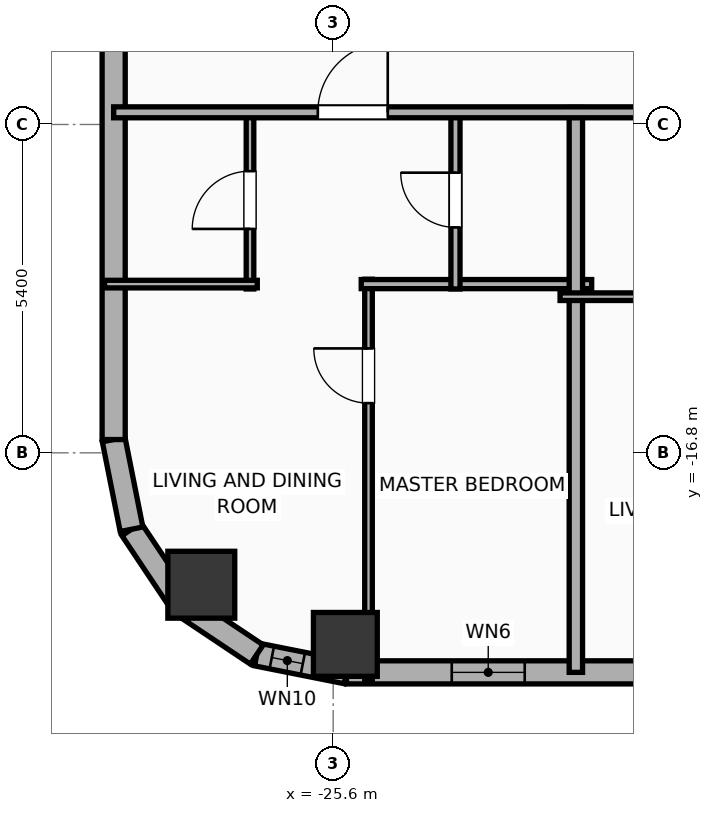
"""IFC4 building model, lengths in metres.
Left out: names, types, materials, properties, quantities, classifications, styles, units other than length and angle.
Written with IfcOpenShell. Run it as: python <this file> out.ifc"""

import sys

from ifc_helpers import new_model, si_unit, direction, frame, frame_2d, origin, origin_2d, place, context, subcontext, project, spatial, rectangle, hollow_rectangle, hollow_circle, extrude, element, fill, save


model = new_model("IFC4")
c1 = context("Model", 3, precision=1e-05, world=origin(), true_north=direction((0.0, 1.0)))
c2 = subcontext(c1, "Body", "Model", "MODEL_VIEW")
j1 = project(units=[si_unit("LENGTHUNIT", "METRE"), si_unit("PLANEANGLEUNIT", "RADIAN")], contexts=[c1])
p1 = place(None, origin())
s1 = spatial("IfcSite", under=j1, at=p1, CompositionType="ELEMENT")
p2 = place(p1, origin())
s2 = spatial("IfcBuilding", under=s1, at=p2, CompositionType="ELEMENT")
p3 = place(p2, frame((0.0, 0.0, 120.9)))
s3 = spatial("IfcBuildingStorey", under=s2, at=p3, CompositionType="ELEMENT", Elevation=120.9)
p4 = place(p3, frame((-25.4, -19.95, 0.0), z_axis=(0.0, 0.0, 1.0), x_axis=(1.0, 0.0, 0.0)))
e1 = element("IfcColumn", 1, at=p4, inside=s3, PredefinedType="COLUMN", context=c2, shape_type="SweptSolid", body=[
    extrude(hollow_rectangle(XDim=1.05, YDim=1.05, WallThickness=0.036, at=origin_2d()), origin(), (0.0, 0.0, 1.0), 3.9),
])
p5 = place(p3, frame((-27.769, -18.969, 0.0), z_axis=(0.0, 0.0, 1.0), x_axis=(1.0, 0.0, 0.0)))
e2 = element("IfcColumn", 2, at=p5, inside=s3, PredefinedType="COLUMN", context=c2, shape_type="SweptSolid", body=[
    extrude(hollow_circle(Radius=0.55, WallThickness=0.036, at=origin_2d()), origin(), (0.0, 0.0, 1.0), 3.9),
])
p6 = place(p3, frame((29.381, -20.41, 0.0), z_axis=(0.0, 0.0, 1.0), x_axis=(-1.0, 0.0, 0.0)))
e3 = element("IfcWall", 3, at=p6, inside=s3, PredefinedType="ELEMENTEDWALL", context=c2, shape_type="SweptSolid", body=[
    extrude(rectangle(XDim=54.763, YDim=0.38, at=frame_2d((27.381, 0.0))), origin(), (0.0, 0.0, 1.0), 3.65),
])
p7 = place(p6, frame((5.645, 0.0, 0.75)))
e4 = element("IfcOpeningElement", 4, at=p7, cuts=e3, PredefinedType="OPENING", context=c2, shape_type="SweptSolid", body=[
    extrude(rectangle(XDim=2.4, YDim=2.1, at=frame_2d((1.2, 1.05))), frame((0.0, 0.2, 0.0), z_axis=(0.0, -1.0, 0.0), x_axis=(1.0, 0.0, 0.0)), (0.0, 0.0, 1.0), 0.4),
])
p8 = place(p6, frame((47.567, 0.0, 0.75)))
e5 = element("IfcOpeningElement", 5, at=p8, cuts=e3, PredefinedType="OPENING", context=c2, shape_type="SweptSolid", body=[
    extrude(rectangle(XDim=2.4, YDim=2.1, at=frame_2d((1.2, 1.05))), frame((0.0, 0.2, 0.0), z_axis=(0.0, -1.0, 0.0), x_axis=(1.0, 0.0, 0.0)), (0.0, 0.0, 1.0), 0.4),
])
p9 = place(p6, frame((51.831, 0.0, 0.75)))
e6 = element("IfcOpeningElement", 6, at=p9, cuts=e3, PredefinedType="OPENING", context=c2, shape_type="SweptSolid", body=[
    extrude(rectangle(XDim=1.2, YDim=2.05, at=frame_2d((0.6, 1.025))), frame((0.0, 0.2, 0.0), z_axis=(0.0, -1.0, 0.0), x_axis=(1.0, 0.0, 0.0)), (0.0, 0.0, 1.0), 0.4),
])
p10 = place(p6, frame((44.606, 0.0, 0.75)))
e7 = element("IfcOpeningElement", 7, at=p10, cuts=e3, PredefinedType="OPENING", context=c2, shape_type="SweptSolid", body=[
    extrude(rectangle(XDim=1.2, YDim=2.05, at=frame_2d((0.6, 1.025))), frame((0.0, 0.2, 0.0), z_axis=(0.0, -1.0, 0.0), x_axis=(1.0, 0.0, 0.0)), (0.0, 0.0, 1.0), 0.4),
])
p11 = place(p6, frame((40.986, 0.0, 0.75)))
e8 = element("IfcOpeningElement", 8, at=p11, cuts=e3, PredefinedType="OPENING", context=c2, shape_type="SweptSolid", body=[
    extrude(rectangle(XDim=1.2, YDim=2.05, at=frame_2d((0.6, 1.025))), frame((0.0, 0.2, 0.0), z_axis=(0.0, -1.0, 0.0), x_axis=(1.0, 0.0, 0.0)), (0.0, 0.0, 1.0), 0.4),
])
p12 = place(p6, frame((37.486, 0.0, 0.75)))
e9 = element("IfcOpeningElement", 9, at=p12, cuts=e3, PredefinedType="OPENING", context=c2, shape_type="SweptSolid", body=[
    extrude(rectangle(XDim=1.2, YDim=2.05, at=frame_2d((0.6, 1.025))), frame((0.0, 0.2, 0.0), z_axis=(0.0, -1.0, 0.0), x_axis=(1.0, 0.0, 0.0)), (0.0, 0.0, 1.0), 0.4),
])
p13 = place(p6, frame((33.986, 0.0, 0.75)))
e10 = element("IfcOpeningElement", 10, at=p13, cuts=e3, PredefinedType="OPENING", context=c2, shape_type="SweptSolid", body=[
    extrude(rectangle(XDim=1.2, YDim=2.05, at=frame_2d((0.6, 1.025))), frame((0.0, 0.2, 0.0), z_axis=(0.0, -1.0, 0.0), x_axis=(1.0, 0.0, 0.0)), (0.0, 0.0, 1.0), 0.4),
])
p14 = place(p6, frame((30.486, 0.0, 0.75)))
e11 = element("IfcOpeningElement", 11, at=p14, cuts=e3, PredefinedType="OPENING", context=c2, shape_type="SweptSolid", body=[
    extrude(rectangle(XDim=1.2, YDim=2.05, at=frame_2d((0.6, 1.025))), frame((0.0, 0.2, 0.0), z_axis=(0.0, -1.0, 0.0), x_axis=(1.0, 0.0, 0.0)), (0.0, 0.0, 1.0), 0.4),
])
p15 = place(p6, frame((26.986, 0.0, 0.75)))
e12 = element("IfcOpeningElement", 12, at=p15, cuts=e3, PredefinedType="OPENING", context=c2, shape_type="SweptSolid", body=[
    extrude(rectangle(XDim=1.2, YDim=2.05, at=frame_2d((0.6, 1.025))), frame((0.0, 0.2, 0.0), z_axis=(0.0, -1.0, 0.0), x_axis=(1.0, 0.0, 0.0)), (0.0, 0.0, 1.0), 0.4),
])
p16 = place(p6, frame((23.486, 0.0, 0.75)))
e13 = element("IfcOpeningElement", 13, at=p16, cuts=e3, PredefinedType="OPENING", context=c2, shape_type="SweptSolid", body=[
    extrude(rectangle(XDim=1.2, YDim=2.05, at=frame_2d((0.6, 1.025))), frame((0.0, 0.2, 0.0), z_axis=(0.0, -1.0, 0.0), x_axis=(1.0, 0.0, 0.0)), (0.0, 0.0, 1.0), 0.4),
])
p17 = place(p6, frame((19.986, 0.0, 0.75)))
e14 = element("IfcOpeningElement", 14, at=p17, cuts=e3, PredefinedType="OPENING", context=c2, shape_type="SweptSolid", body=[
    extrude(rectangle(XDim=1.2, YDim=2.05, at=frame_2d((0.6, 1.025))), frame((0.0, 0.2, 0.0), z_axis=(0.0, -1.0, 0.0), x_axis=(1.0, 0.0, 0.0)), (0.0, 0.0, 1.0), 0.4),
])
p18 = place(p6, frame((16.486, 0.0, 0.75)))
e15 = element("IfcOpeningElement", 15, at=p18, cuts=e3, PredefinedType="OPENING", context=c2, shape_type="SweptSolid", body=[
    extrude(rectangle(XDim=1.2, YDim=2.05, at=frame_2d((0.6, 1.025))), frame((0.0, 0.2, 0.0), z_axis=(0.0, -1.0, 0.0), x_axis=(1.0, 0.0, 0.0)), (0.0, 0.0, 1.0), 0.4),
])
p19 = place(p6, frame((11.698, 0.0, 0.75)))
e16 = element("IfcOpeningElement", 16, at=p19, cuts=e3, PredefinedType="OPENING", context=c2, shape_type="SweptSolid", body=[
    extrude(rectangle(XDim=1.2, YDim=2.05, at=frame_2d((0.6, 1.025))), frame((0.0, 0.2, 0.0), z_axis=(0.0, -1.0, 0.0), x_axis=(1.0, 0.0, 0.0)), (0.0, 0.0, 1.0), 0.4),
])
p20 = place(p6, frame((3.172, 0.0, 0.75)))
e17 = element("IfcOpeningElement", 17, at=p20, cuts=e3, PredefinedType="OPENING", context=c2, shape_type="SweptSolid", body=[
    extrude(rectangle(XDim=1.2, YDim=2.05, at=frame_2d((0.6, 1.025))), frame((0.0, 0.2, 0.0), z_axis=(0.0, -1.0, 0.0), x_axis=(1.0, 0.0, 0.0)), (0.0, 0.0, 1.0), 0.4),
])
p21 = place(p6, frame((1.13, 0.0, 0.75)))
e18 = element("IfcOpeningElement", 18, at=p21, cuts=e3, PredefinedType="OPENING", context=c2, shape_type="SweptSolid", body=[
    extrude(rectangle(XDim=1.2, YDim=2.05, at=frame_2d((0.6, 1.025))), frame((0.0, 0.2, 0.0), z_axis=(0.0, -1.0, 0.0), x_axis=(1.0, 0.0, 0.0)), (0.0, 0.0, 1.0), 0.4),
])
p22 = place(p3, frame((-25.381, -20.41, 0.0), z_axis=(0.0, 0.0, 1.0), x_axis=(-0.980786132421, 0.195086038585, 0.0)))
e19 = element("IfcWall", 19, at=p22, inside=s3, PredefinedType="ELEMENTEDWALL", context=c2, shape_type="SweptSolid", body=[
    extrude(rectangle(XDim=1.504, YDim=0.38, at=frame_2d((0.752, 0.0))), origin(), (0.0, 0.0, 1.0), 3.65),
])
p23 = place(p22, frame((0.732, 0.0, 0.75)))
e20 = element("IfcOpeningElement", 20, at=p23, cuts=e19, PredefinedType="OPENING", context=c2, shape_type="SweptSolid", body=[
    extrude(rectangle(XDim=0.52, YDim=2.05, at=frame_2d((0.26, 1.025))), frame((0.0, 0.2, 0.0), z_axis=(0.0, -1.0, 0.0), x_axis=(1.0, 0.0, 0.0)), (0.0, 0.0, 1.0), 0.4),
])
p24 = place(p3, frame((-26.857, -20.116, 0.0), z_axis=(0.0, 0.0, 1.0), x_axis=(-0.831468045563, 0.555572577804, 0.0)))
e21 = element("IfcWall", 21, at=p24, inside=s3, PredefinedType="ELEMENTEDWALL", context=c2, shape_type="SweptSolid", body=[
    extrude(rectangle(XDim=1.485, YDim=0.38, at=frame_2d((0.742, 0.0))), origin(), (0.0, 0.0, 1.0), 3.65),
])
p25 = place(p3, frame((-28.091, -19.292, 0.0), z_axis=(0.0, 0.0, 1.0), x_axis=(-0.555610286119, 0.831442848281, 0.0)))
e22 = element("IfcWall", 22, at=p25, inside=s3, PredefinedType="ELEMENTEDWALL", context=c2, shape_type="SweptSolid", body=[
    extrude(rectangle(XDim=1.485, YDim=0.38, at=frame_2d((0.743, 0.0))), origin(), (0.0, 0.0, 1.0), 3.65),
])
p26 = place(p3, frame((-28.917, -18.057, 0.0), z_axis=(0.0, 0.0, 1.0), x_axis=(-0.195086038585, 0.980786132421, 0.0)))
e23 = element("IfcWall", 23, at=p26, inside=s3, PredefinedType="ELEMENTEDWALL", context=c2, shape_type="SweptSolid", body=[
    extrude(rectangle(XDim=1.504, YDim=0.38, at=frame_2d((0.752, 0.0))), origin(), (0.0, 0.0, 1.0), 3.65),
])
p27 = place(p3, frame((-29.21, -16.581, 0.0), z_axis=(0.0, 0.0, 1.0), x_axis=(0.0, 1.0, 0.0)))
e24 = element("IfcWall", 24, at=p27, inside=s3, PredefinedType="ELEMENTEDWALL", context=c2, shape_type="SweptSolid", body=[
    extrude(rectangle(XDim=34.363, YDim=0.38, at=frame_2d((17.181, 0.0))), origin(), (0.0, 0.0, 1.0), 3.65),
])
p28 = place(p27, frame((31.637, 0.0, 0.75)))
e25 = element("IfcOpeningElement", 25, at=p28, cuts=e24, PredefinedType="OPENING", context=c2, shape_type="SweptSolid", body=[
    extrude(rectangle(XDim=1.2, YDim=2.05, at=frame_2d((0.6, 1.025))), frame((0.0, 0.2, 0.0), z_axis=(0.0, -1.0, 0.0), x_axis=(1.0, 0.0, 0.0)), (0.0, 0.0, 1.0), 0.4),
])
p29 = place(p27, frame((20.876, 0.0, 0.75)))
e26 = element("IfcOpeningElement", 26, at=p29, cuts=e24, PredefinedType="OPENING", context=c2, shape_type="SweptSolid", body=[
    extrude(rectangle(XDim=1.2, YDim=2.05, at=frame_2d((0.6, 1.025))), frame((0.0, 0.2, 0.0), z_axis=(0.0, -1.0, 0.0), x_axis=(1.0, 0.0, 0.0)), (0.0, 0.0, 1.0), 0.4),
])
p30 = place(p27, frame((11.226, 0.0, 0.75)))
e27 = element("IfcOpeningElement", 27, at=p30, cuts=e24, PredefinedType="OPENING", context=c2, shape_type="SweptSolid", body=[
    extrude(rectangle(XDim=1.2, YDim=2.05, at=frame_2d((0.6, 1.025))), frame((0.0, 0.2, 0.0), z_axis=(0.0, -1.0, 0.0), x_axis=(1.0, 0.0, 0.0)), (0.0, 0.0, 1.0), 0.4),
])
p31 = place(p3, frame((-25.019, -20.56, 0.0), z_axis=(0.0, 0.0, 1.0), x_axis=(0.0, 1.0, 0.0)))
e28 = element("IfcWall", 28, at=p31, inside=s3, PredefinedType="PARTITIONING", context=c2, shape_type="SweptSolid", body=[
    extrude(rectangle(XDim=6.615, YDim=0.125, at=frame_2d((3.308, 0.0))), origin(), (0.0, 0.0, 1.0), 3.65),
])
p32 = place(p31, frame((4.577, 0.0, 0.0)))
e29 = element("IfcOpeningElement", 29, at=p32, cuts=e28, PredefinedType="OPENING", context=c2, shape_type="SweptSolid", body=[
    extrude(rectangle(XDim=0.9, YDim=2.05, at=frame_2d((0.45, 1.025))), frame((0.0, 0.073, 0.0), z_axis=(0.0, -1.0, 0.0), x_axis=(1.0, 0.0, 0.0)), (0.0, 0.0, 1.0), 0.145),
])
p33 = place(p3, frame((-25.139, -14.025, 0.0), z_axis=(0.0, 0.0, 1.0), x_axis=(1.0, 0.0, 0.0)))
e30 = element("IfcWall", 30, at=p33, inside=s3, PredefinedType="PLUMBINGWALL", context=c2, shape_type="SweptSolid", body=[
    extrude(rectangle(XDim=3.79, YDim=0.15, at=frame_2d((1.895, 0.0))), origin(), (0.0, 0.0, 1.0), 3.65),
])
p34 = place(p3, frame((-26.968, -14.105, 0.0), z_axis=(0.0, 0.0, 1.0), x_axis=(0.0, 1.0, 0.0)))
e31 = element("IfcWall", 31, at=p34, inside=s3, PredefinedType="PARTITIONING", context=c2, shape_type="SweptSolid", body=[
    extrude(rectangle(XDim=2.925, YDim=0.125, at=frame_2d((1.462, 0.0))), origin(), (0.0, 0.0, 1.0), 3.65),
])
p35 = place(p34, frame((0.988, 0.0, 0.0)))
e32 = element("IfcOpeningElement", 32, at=p35, cuts=e31, PredefinedType="OPENING", context=c2, shape_type="SweptSolid", body=[
    extrude(rectangle(XDim=0.95, YDim=2.05, at=frame_2d((0.475, 1.025))), frame((0.0, 0.073, 0.0), z_axis=(0.0, -1.0, 0.0), x_axis=(1.0, 0.0, 0.0)), (0.0, 0.0, 1.0), 0.145),
])
p36 = place(p3, frame((-29.36, -14.025, 0.0), z_axis=(0.0, 0.0, 1.0), x_axis=(1.0, 0.0, 0.0)))
e33 = element("IfcWall", 33, at=p36, inside=s3, PredefinedType="PARTITIONING", context=c2, shape_type="SweptSolid", body=[
    extrude(rectangle(XDim=2.512, YDim=0.125, at=frame_2d((1.256, 0.0))), origin(), (0.0, 0.0, 1.0), 3.65),
])
p37 = place(p3, frame((-23.589, -14.105, 0.0), z_axis=(0.0, 0.0, 1.0), x_axis=(0.0, 1.0, 0.0)))
e34 = element("IfcWall", 34, at=p37, inside=s3, PredefinedType="PLUMBINGWALL", context=c2, shape_type="SweptSolid", body=[
    extrude(rectangle(XDim=2.925, YDim=0.15, at=frame_2d((1.462, 0.0))), origin(), (0.0, 0.0, 1.0), 3.65),
])
p38 = place(p37, frame((1.012, 0.0, 0.0)))
e35 = element("IfcOpeningElement", 35, at=p38, cuts=e34, PredefinedType="OPENING", context=c2, shape_type="SweptSolid", body=[
    extrude(rectangle(XDim=0.9, YDim=2.05, at=frame_2d((0.45, 1.025))), frame((0.0, 0.085, 0.0), z_axis=(0.0, -1.0, 0.0), x_axis=(1.0, 0.0, 0.0)), (0.0, 0.0, 1.0), 0.17),
])
p39 = place(p3, frame((-21.609, -20.41, 0.0), z_axis=(0.0, 0.0, 1.0), x_axis=(0.0, 1.0, 0.0)))
e36 = element("IfcWall", 36, at=p39, inside=s3, PredefinedType="PARTITIONING", context=c2, shape_type="SweptSolid", body=[
    extrude(rectangle(XDim=9.29, YDim=0.22, at=frame_2d((4.645, 0.0))), origin(), (0.0, 0.0, 1.0), 3.65),
])
p40 = place(p3, frame((-21.869, -14.232, 0.0), z_axis=(0.0, 0.0, 1.0), x_axis=(1.0, 0.0, 0.0)))
e37 = element("IfcWall", 37, at=p40, inside=s3, PredefinedType="PARTITIONING", context=c2, shape_type="SweptSolid", body=[
    extrude(rectangle(XDim=2.69, YDim=0.125, at=frame_2d((1.345, 0.0))), origin(), (0.0, 0.0, 1.0), 3.65),
])
p41 = place(p3, frame((-29.21, -11.2, 0.0), z_axis=(0.0, 0.0, 1.0), x_axis=(1.0, 0.0, 0.0)))
e38 = element("IfcWall", 38, at=p41, inside=s3, PredefinedType="PARTITIONING", context=c2, shape_type="SweptSolid", body=[
    extrude(rectangle(XDim=62.42, YDim=0.18, at=frame_2d((31.21, 0.0))), origin(), (0.0, 0.0, 1.0), 3.65),
])
p42 = place(p41, frame((3.357, 0.0, 0.0)))
e39 = element("IfcOpeningElement", 39, at=p42, cuts=e38, PredefinedType="OPENING", context=c2, shape_type="SweptSolid", body=[
    extrude(rectangle(XDim=1.15, YDim=2.05, at=frame_2d((0.575, 1.025))), frame((0.0, 0.1, 0.0), z_axis=(0.0, -1.0, 0.0), x_axis=(1.0, 0.0, 0.0)), (0.0, 0.0, 1.0), 0.2),
])
p43 = place(p41, frame((10.998, 0.0, 0.0)))
e40 = element("IfcOpeningElement", 40, at=p43, cuts=e38, PredefinedType="OPENING", context=c2, shape_type="SweptSolid", body=[
    extrude(rectangle(XDim=1.15, YDim=2.05, at=frame_2d((0.575, 1.025))), frame((0.0, 0.1, 0.0), z_axis=(0.0, -1.0, 0.0), x_axis=(1.0, 0.0, 0.0)), (0.0, 0.0, 1.0), 0.2),
])
p44 = place(p41, frame((18.426, 0.0, 0.0)))
e41 = element("IfcOpeningElement", 41, at=p44, cuts=e38, PredefinedType="OPENING", context=c2, shape_type="SweptSolid", body=[
    extrude(rectangle(XDim=0.9, YDim=2.05, at=frame_2d((0.45, 1.025))), frame((0.0, 0.1, 0.0), z_axis=(0.0, -1.0, 0.0), x_axis=(1.0, 0.0, 0.0)), (0.0, 0.0, 1.0), 0.2),
])
p45 = place(p41, frame((25.423, 0.0, 0.0)))
e42 = element("IfcOpeningElement", 42, at=p45, cuts=e38, PredefinedType="OPENING", context=c2, shape_type="SweptSolid", body=[
    extrude(rectangle(XDim=0.9, YDim=2.05, at=frame_2d((0.45, 1.025))), frame((0.0, 0.1, 0.0), z_axis=(0.0, -1.0, 0.0), x_axis=(1.0, 0.0, 0.0)), (0.0, 0.0, 1.0), 0.2),
])
p46 = place(p41, frame((32.427, 0.0, 0.0)))
e43 = element("IfcOpeningElement", 43, at=p46, cuts=e38, PredefinedType="OPENING", context=c2, shape_type="SweptSolid", body=[
    extrude(rectangle(XDim=0.9, YDim=2.05, at=frame_2d((0.45, 1.025))), frame((0.0, 0.1, 0.0), z_axis=(0.0, -1.0, 0.0), x_axis=(1.0, 0.0, 0.0)), (0.0, 0.0, 1.0), 0.2),
])
p47 = place(p41, frame((39.424, 0.0, 0.0)))
e44 = element("IfcOpeningElement", 44, at=p47, cuts=e38, PredefinedType="OPENING", context=c2, shape_type="SweptSolid", body=[
    extrude(rectangle(XDim=0.9, YDim=2.05, at=frame_2d((0.45, 1.025))), frame((0.0, 0.1, 0.0), z_axis=(0.0, -1.0, 0.0), x_axis=(1.0, 0.0, 0.0)), (0.0, 0.0, 1.0), 0.2),
])
p48 = place(p41, frame((46.09, 0.0, 0.0)))
e45 = element("IfcOpeningElement", 45, at=p48, cuts=e38, PredefinedType="OPENING", context=c2, shape_type="SweptSolid", body=[
    extrude(rectangle(XDim=0.9, YDim=2.05, at=frame_2d((0.45, 1.025))), frame((0.0, 0.1, 0.0), z_axis=(0.0, -1.0, 0.0), x_axis=(1.0, 0.0, 0.0)), (0.0, 0.0, 1.0), 0.2),
])
p49 = place(p41, frame((51.071, 0.0, 0.0)))
e46 = element("IfcOpeningElement", 46, at=p49, cuts=e38, PredefinedType="OPENING", context=c2, shape_type="SweptSolid", body=[
    extrude(rectangle(XDim=1.15, YDim=2.05, at=frame_2d((0.575, 1.025))), frame((0.0, 0.1, 0.0), z_axis=(0.0, -1.0, 0.0), x_axis=(1.0, 0.0, 0.0)), (0.0, 0.0, 1.0), 0.2),
])
p50 = place(p41, frame((58.93, 0.0, 0.0)))
e47 = element("IfcOpeningElement", 47, at=p50, cuts=e38, PredefinedType="OPENING", context=c2, shape_type="SweptSolid", body=[
    extrude(rectangle(XDim=0.9, YDim=2.05, at=frame_2d((0.45, 1.025))), frame((0.0, 0.1, 0.0), z_axis=(0.0, -1.0, 0.0), x_axis=(1.0, 0.0, 0.0)), (0.0, 0.0, 1.0), 0.2),
])
p51 = place(p23, origin())
e48 = element("IfcWindow", 48, at=p51, inside=s3, PartitioningType="SINGLE_PANEL", PredefinedType="WINDOW", context=c2, shape_type="SweptSolid", body=[
    extrude(rectangle(XDim=0.52, YDim=2.05, at=frame_2d((0.26, 1.025))), frame((0.0, 0.03, 0.0), z_axis=(0.0, -1.0, 0.0), x_axis=(1.0, 0.0, 0.0)), (0.0, 0.0, 1.0), 0.06),
])
fill(e20, e48)
p52 = place(p9, origin())
e49 = element("IfcWindow", 49, at=p52, inside=s3, PartitioningType="SINGLE_PANEL", PredefinedType="WINDOW", context=c2, shape_type="SweptSolid", body=[
    extrude(rectangle(XDim=1.2, YDim=2.05, at=frame_2d((0.6, 1.025))), frame((0.0, 0.03, 0.0), z_axis=(0.0, -1.0, 0.0), x_axis=(1.0, 0.0, 0.0)), (0.0, 0.0, 1.0), 0.06),
])
fill(e6, e49)
p53 = place(p32, origin())
e50 = element("IfcDoor", 50, at=p53, inside=s3, OperationType="SINGLE_SWING_RIGHT", PredefinedType="DOOR", context=c2, shape_type="SweptSolid", body=[
    extrude(rectangle(XDim=0.9, YDim=2.05, at=frame_2d((0.45, 1.025))), frame((0.0, 0.025, 0.0), z_axis=(0.0, -1.0, 0.0), x_axis=(1.0, 0.0, 0.0)), (0.0, 0.0, 1.0), 0.05),
])
fill(e29, e50)
p54 = place(p35, origin())
e51 = element("IfcDoor", 51, at=p54, inside=s3, OperationType="SINGLE_SWING_LEFT", PredefinedType="DOOR", context=c2, shape_type="SweptSolid", body=[
    extrude(rectangle(XDim=0.95, YDim=2.05, at=frame_2d((0.475, 1.025))), frame((0.0, 0.025, 0.0), z_axis=(0.0, -1.0, 0.0), x_axis=(1.0, 0.0, 0.0)), (0.0, 0.0, 1.0), 0.05),
])
fill(e32, e51)
p55 = place(p38, origin())
e52 = element("IfcDoor", 52, at=p55, inside=s3, OperationType="SINGLE_SWING_RIGHT", PredefinedType="DOOR", context=c2, shape_type="SweptSolid", body=[
    extrude(rectangle(XDim=0.9, YDim=2.05, at=frame_2d((0.45, 1.025))), frame((0.0, 0.025, 0.0), z_axis=(0.0, -1.0, 0.0), x_axis=(1.0, 0.0, 0.0)), (0.0, 0.0, 1.0), 0.05),
])
fill(e35, e52)
p56 = place(p42, origin())
e53 = element("IfcDoor", 53, at=p56, inside=s3, OperationType="SINGLE_SWING_RIGHT", PredefinedType="DOOR", context=c2, shape_type="SweptSolid", body=[
    extrude(rectangle(XDim=1.15, YDim=2.05, at=frame_2d((0.575, 1.025))), frame((0.0, 0.025, 0.0), z_axis=(0.0, -1.0, 0.0), x_axis=(1.0, 0.0, 0.0)), (0.0, 0.0, 1.0), 0.05),
])
fill(e39, e53)
save(model, sys.argv[1])
